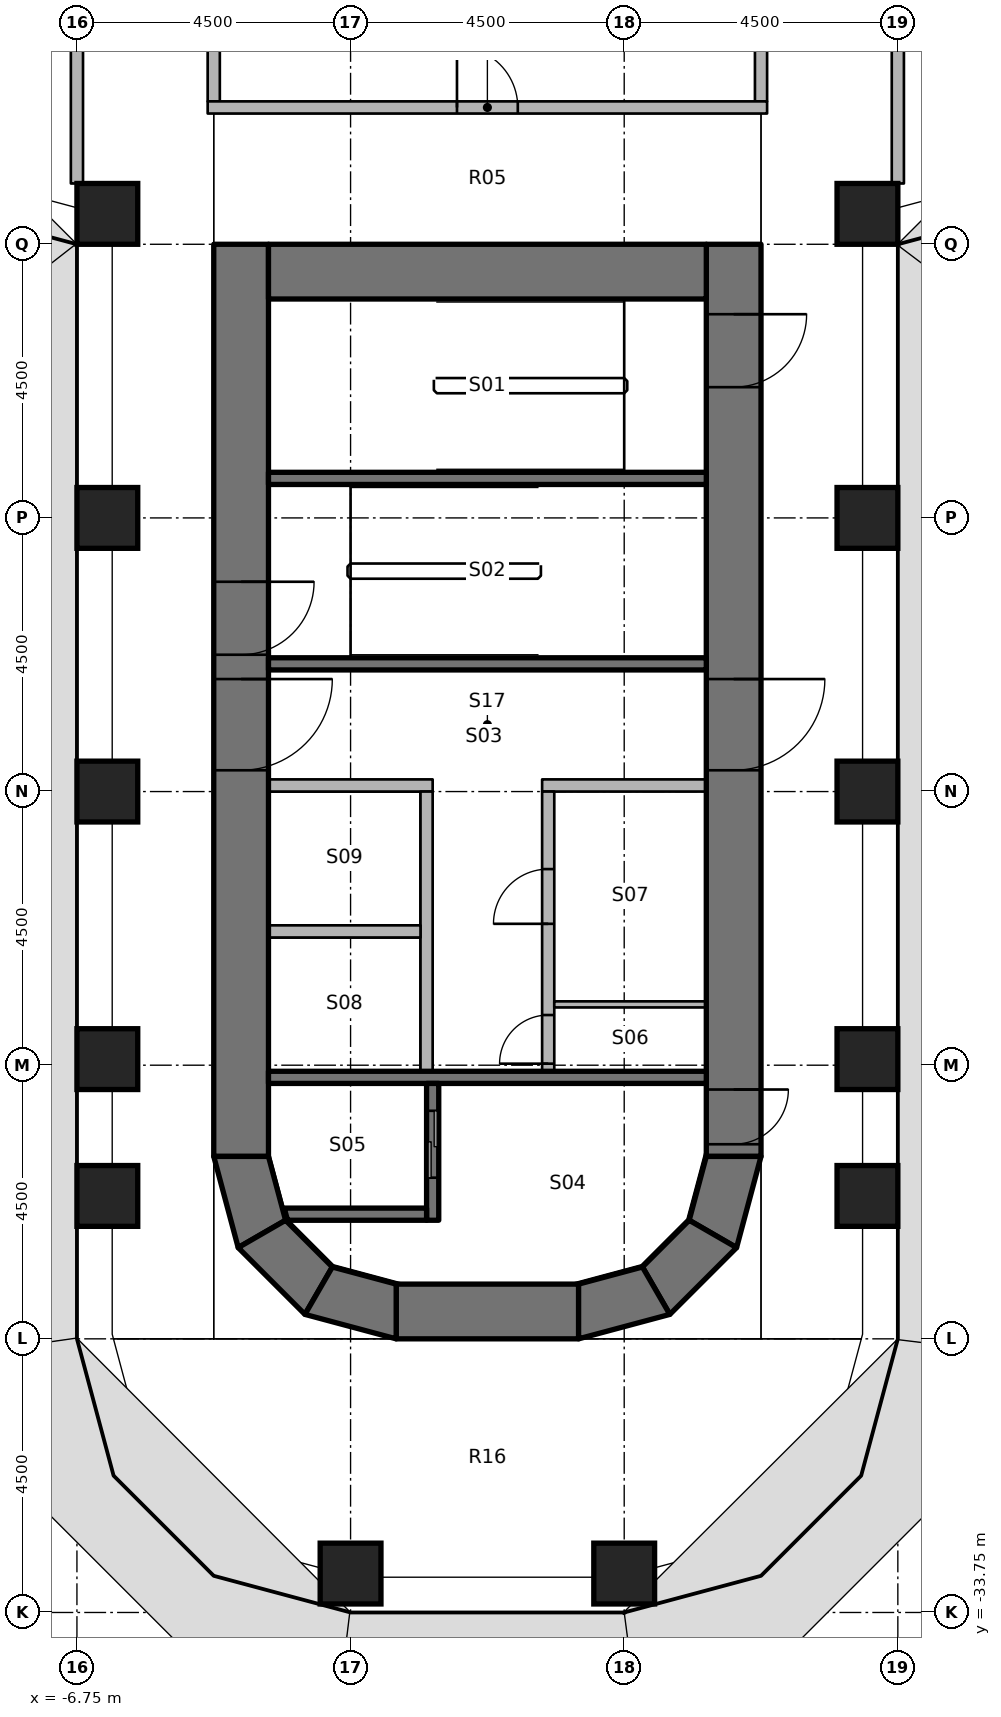
"""IFC4 building model, lengths in metres.
Left out: names, types, materials, properties, quantities, classifications, styles, units other than length and angle.
Written with IfcOpenShell. Run it as: python <this file> out.ifc"""

import sys

from ifc_helpers import new_model, si_unit, direction, frame, frame_2d, origin, origin_2d, place, context, subcontext, project, spatial, polyline, rectangle, outline, extrude, element, fill, save


model = new_model("IFC4")
c1 = context("Model", 3, precision=1e-05, world=origin(), true_north=direction((0.0, 1.0)))
c2 = subcontext(c1, "Body", "Model", "MODEL_VIEW")
j1 = project(units=[si_unit("LENGTHUNIT", "METRE"), si_unit("PLANEANGLEUNIT", "RADIAN")], contexts=[c1])
p1 = place(None, origin())
s1 = spatial("IfcSite", under=j1, at=p1, CompositionType="ELEMENT")
p2 = place(p1, origin())
s2 = spatial("IfcBuilding", under=s1, at=p2, CompositionType="ELEMENT")
p3 = place(p2, frame((0.0, 0.0, 31.2)))
s3 = spatial("IfcBuildingStorey", under=s2, at=p3, CompositionType="ELEMENT", Elevation=31.2)
for number, where, z_axis, x_axis in (
    (1, (-6.25, -26.9, 0.0), (0.0, 0.0, 1.0), (1.0, 0.0, 0.0)),
    (2, (-6.25, -24.65, 0.0), (0.0, 0.0, 1.0), (1.0, 0.0, 0.0)),
    (3, (-6.25, -20.25, 0.0), (0.0, 0.0, 1.0), (1.0, 0.0, 0.0)),
    (4, (-6.25, -15.75, 0.0), (0.0, 0.0, 1.0), (1.0, 0.0, 0.0)),
    (5, (-6.25, -10.75, 0.0), (0.0, 0.0, 1.0), (1.0, 0.0, 0.0)),
    (6, (-2.25, -33.11, 0.0), (0.0, 0.0, 1.0), (1.0, 0.0, 0.0)),
    (7, (2.25, -33.11, 0.0), (0.0, 0.0, 1.0), (1.0, 0.0, 0.0)),
    (8, (6.25, -26.9, 0.0), (0.0, 0.0, 1.0), (1.0, 0.0, 0.0)),
    (9, (6.25, -24.65, 0.0), (0.0, 0.0, 1.0), (1.0, 0.0, 0.0)),
    (10, (6.25, -20.25, 0.0), (0.0, 0.0, 1.0), (1.0, 0.0, 0.0)),
    (11, (6.25, -15.75, 0.0), (0.0, 0.0, 1.0), (1.0, 0.0, 0.0)),
    (12, (6.25, -10.75, 0.0), (0.0, 0.0, 1.0), (1.0, 0.0, 0.0)),
):
    element("IfcColumn", number, at=place(p3, frame(where, z_axis=z_axis, x_axis=x_axis)), inside=s3, PredefinedType="COLUMN", context=c2, shape_type="SweptSolid", body=[
        extrude(rectangle(XDim=1.0, YDim=1.0, at=origin_2d()), origin(), (0.0, 0.0, 1.0), 4.05),
    ])
p4 = place(p3, frame((-4.05, -11.25, 0.0), z_axis=(0.0, 0.0, 1.0), x_axis=(0.0, -1.0, 0.0)))
e13 = element("IfcWall", 13, at=p4, inside=s3, PredefinedType="SHEAR", context=c2, shape_type="SweptSolid", body=[
    extrude(rectangle(XDim=15.0, YDim=0.9, at=frame_2d((7.5, 0.0))), origin(), (0.0, 0.0, 1.0), 4.2),
])
p5 = place(p4, frame((7.15, 0.0, 0.0)))
e14 = element("IfcOpeningElement", 14, at=p5, cuts=e13, PredefinedType="OPENING", context=c2, shape_type="SweptSolid", body=[
    extrude(rectangle(XDim=1.5, YDim=2.3, at=frame_2d((0.75, 1.15))), frame((0.0, 0.46, 0.0), z_axis=(0.0, -1.0, 0.0), x_axis=(1.0, 0.0, 0.0)), (0.0, 0.0, 1.0), 0.92),
])
p6 = place(p4, frame((5.55, 0.0, 0.0)))
e15 = element("IfcOpeningElement", 15, at=p6, cuts=e13, PredefinedType="OPENING", context=c2, shape_type="SweptSolid", body=[
    extrude(rectangle(XDim=1.2, YDim=2.1, at=frame_2d((0.6, 1.05))), frame((0.0, 0.46, 0.0), z_axis=(0.0, -1.0, 0.0), x_axis=(1.0, 0.0, 0.0)), (0.0, 0.0, 1.0), 0.92),
])
p7 = place(p3, frame((4.05, -11.25, 0.0), z_axis=(0.0, 0.0, 1.0), x_axis=(0.0, -1.0, 0.0)))
e16 = element("IfcWall", 16, at=p7, inside=s3, PredefinedType="SHEAR", context=c2, shape_type="SweptSolid", body=[
    extrude(rectangle(XDim=15.0, YDim=0.9, at=frame_2d((7.5, 0.0))), origin(), (0.0, 0.0, 1.0), 4.2),
])
p8 = place(p7, frame((7.15, 0.0, 0.0)))
e17 = element("IfcOpeningElement", 17, at=p8, cuts=e16, PredefinedType="OPENING", context=c2, shape_type="SweptSolid", body=[
    extrude(rectangle(XDim=1.5, YDim=2.3, at=frame_2d((0.75, 1.15))), frame((0.0, 0.46, 0.0), z_axis=(0.0, -1.0, 0.0), x_axis=(1.0, 0.0, 0.0)), (0.0, 0.0, 1.0), 0.92),
])
p9 = place(p7, frame((13.9, 0.0, 0.0)))
e18 = element("IfcOpeningElement", 18, at=p9, cuts=e16, PredefinedType="OPENING", context=c2, shape_type="SweptSolid", body=[
    extrude(rectangle(XDim=0.9, YDim=2.1, at=frame_2d((0.45, 1.05))), frame((0.0, 0.46, 0.0), z_axis=(0.0, -1.0, 0.0), x_axis=(1.0, 0.0, 0.0)), (0.0, 0.0, 1.0), 0.92),
])
p10 = place(p7, frame((1.15, 0.0, 0.0)))
e19 = element("IfcOpeningElement", 19, at=p10, cuts=e16, PredefinedType="OPENING", context=c2, shape_type="SweptSolid", body=[
    extrude(rectangle(XDim=1.2, YDim=2.1, at=frame_2d((0.6, 1.05))), frame((0.0, 0.46, 0.0), z_axis=(0.0, -1.0, 0.0), x_axis=(1.0, 0.0, 0.0)), (0.0, 0.0, 1.0), 0.92),
])
p11 = place(p3, frame((-3.6, -11.7, 0.0), z_axis=(0.0, 0.0, 1.0), x_axis=(1.0, 0.0, 0.0)))
e20 = element("IfcWall", 20, at=p11, inside=s3, PredefinedType="SHEAR", context=c2, shape_type="SweptSolid", body=[
    extrude(rectangle(XDim=7.2, YDim=0.9, at=frame_2d((3.6, 0.0))), origin(), (0.0, 0.0, 1.0), 4.2),
])
p12 = place(p3, frame((-1.5, -28.8, 0.0), z_axis=(0.0, 0.0, 1.0), x_axis=(1.0, 0.0, 0.0)))
e21 = element("IfcWall", 21, at=p12, inside=s3, PredefinedType="SHEAR", context=c2, shape_type="SweptSolid", body=[
    extrude(rectangle(XDim=3.0, YDim=0.9, at=frame_2d((1.5, 0.0))), origin(), (0.0, 0.0, 1.0), 4.2),
])
p13 = place(p3, origin())
e22 = element("IfcWall", 22, at=p13, inside=s3, PredefinedType="SHEAR", context=c2, shape_type="SweptSolid", body=[
    extrude(outline(polyline([(-4.5, -26.25), (-4.098, -27.75), (-3.319, -27.3), (-3.6, -26.25), (-4.5, -26.25)])), origin(), (0.0, 0.0, 1.0), 4.2),
])
p14 = place(p3, origin())
e23 = element("IfcWall", 23, at=p14, inside=s3, PredefinedType="SHEAR", context=c2, shape_type="SweptSolid", body=[
    extrude(outline(polyline([(-4.098, -27.75), (-3.0, -28.848), (-2.55, -28.069), (-3.319, -27.3), (-4.098, -27.75)])), origin(), (0.0, 0.0, 1.0), 4.2),
])
p15 = place(p3, origin())
e24 = element("IfcWall", 24, at=p15, inside=s3, PredefinedType="SHEAR", context=c2, shape_type="SweptSolid", body=[
    extrude(outline(polyline([(-3.0, -28.848), (-1.5, -29.25), (-1.5, -28.35), (-2.55, -28.069), (-3.0, -28.848)])), origin(), (0.0, 0.0, 1.0), 4.2),
])
p16 = place(p3, origin())
e25 = element("IfcWall", 25, at=p16, inside=s3, PredefinedType="SHEAR", context=c2, shape_type="SweptSolid", body=[
    extrude(outline(polyline([(4.5, -26.25), (4.098, -27.75), (3.319, -27.3), (3.6, -26.25), (4.5, -26.25)])), origin(), (0.0, 0.0, 1.0), 4.2),
])
p17 = place(p3, origin())
e26 = element("IfcWall", 26, at=p17, inside=s3, PredefinedType="SHEAR", context=c2, shape_type="SweptSolid", body=[
    extrude(outline(polyline([(4.098, -27.75), (3.0, -28.848), (2.55, -28.069), (3.319, -27.3), (4.098, -27.75)])), origin(), (0.0, 0.0, 1.0), 4.2),
])
p18 = place(p3, origin())
e27 = element("IfcWall", 27, at=p18, inside=s3, PredefinedType="SHEAR", context=c2, shape_type="SweptSolid", body=[
    extrude(outline(polyline([(3.0, -28.848), (1.5, -29.25), (1.5, -28.35), (2.55, -28.069), (3.0, -28.848)])), origin(), (0.0, 0.0, 1.0), 4.2),
])
p19 = place(p3, frame((3.6, -24.95, 0.0), z_axis=(0.0, 0.0, 1.0), x_axis=(-1.0, 0.0, 0.0)))
e28 = element("IfcWall", 28, at=p19, inside=s3, PredefinedType="SHEAR", context=c2, shape_type="SweptSolid", body=[
    extrude(rectangle(XDim=7.2, YDim=0.2, at=frame_2d((3.6, 0.0))), origin(), (0.0, 0.0, 1.0), 4.05),
])
p20 = place(p3, frame((-0.9, -27.3, 0.0), z_axis=(0.0, 0.0, 1.0), x_axis=(0.0, 1.0, 0.0)))
e29 = element("IfcWall", 29, at=p20, inside=s3, PredefinedType="SHEAR", context=c2, shape_type="SweptSolid", body=[
    extrude(rectangle(XDim=2.25, YDim=0.2, at=frame_2d((1.125, 0.0))), origin(), (0.0, 0.0, 1.0), 4.05),
])
p21 = place(p20, frame((0.7, 0.0, 0.0)))
e30 = element("IfcOpeningElement", 30, at=p21, cuts=e29, PredefinedType="OPENING", context=c2, shape_type="SweptSolid", body=[
    extrude(rectangle(XDim=1.1, YDim=2.3, at=frame_2d((0.55, 1.15))), frame((0.0, 0.11, 0.0), z_axis=(0.0, -1.0, 0.0), x_axis=(1.0, 0.0, 0.0)), (0.0, 0.0, 1.0), 0.22),
])
p22 = place(p3, origin())
e31 = element("IfcWall", 31, at=p22, inside=s3, PredefinedType="SHEAR", context=c2, shape_type="SweptSolid", body=[
    extrude(outline(polyline([(-1.0, -27.1), (-3.341, -27.1), (-3.291, -27.284), (-3.275, -27.3), (-1.0, -27.3), (-1.0, -27.1)])), origin(), (0.0, 0.0, 1.0), 4.05),
])
for number, where, z_axis, x_axis in (
    (32, (3.6, -18.15, 0.0), (0.0, 0.0, 1.0), (-1.0, 0.0, 0.0)),
    (33, (3.6, -15.1, 0.0), (0.0, 0.0, 1.0), (-1.0, 0.0, 0.0)),
):
    element("IfcWall", number, at=place(p3, frame(where, z_axis=z_axis, x_axis=x_axis)), inside=s3, PredefinedType="SHEAR", context=c2, shape_type="SweptSolid", body=[
        extrude(rectangle(XDim=7.2, YDim=0.2, at=frame_2d((3.6, 0.0))), origin(), (0.0, 0.0, 1.0), 4.05),
    ])
p23 = place(p3, frame((3.6, -20.15, 0.0), z_axis=(0.0, 0.0, 1.0), x_axis=(-1.0, 0.0, 0.0)))
e34 = element("IfcWall", 34, at=p23, inside=s3, PredefinedType="PARTITIONING", context=c2, shape_type="SweptSolid", body=[
    extrude(rectangle(XDim=2.7, YDim=0.2, at=frame_2d((1.35, 0.0))), origin(), (0.0, 0.0, 1.0), 4.05),
])
p24 = place(p3, frame((1.0, -24.85, 0.0), z_axis=(0.0, 0.0, 1.0), x_axis=(0.0, 1.0, 0.0)))
e35 = element("IfcWall", 35, at=p24, inside=s3, PredefinedType="PARTITIONING", context=c2, shape_type="SweptSolid", body=[
    extrude(rectangle(XDim=4.6, YDim=0.2, at=frame_2d((2.3, 0.0))), origin(), (0.0, 0.0, 1.0), 4.05),
])
p25 = place(p24, frame((0.125, 0.0, 0.0)))
e36 = element("IfcOpeningElement", 36, at=p25, cuts=e35, PredefinedType="OPENING", context=c2, shape_type="SweptSolid", body=[
    extrude(rectangle(XDim=0.8, YDim=2.1, at=frame_2d((0.4, 1.05))), frame((0.0, 0.11, 0.0), z_axis=(0.0, -1.0, 0.0), x_axis=(1.0, 0.0, 0.0)), (0.0, 0.0, 1.0), 0.22),
])
p26 = place(p24, frame((2.425, 0.0, 0.0)))
e37 = element("IfcOpeningElement", 37, at=p26, cuts=e35, PredefinedType="OPENING", context=c2, shape_type="SweptSolid", body=[
    extrude(rectangle(XDim=0.9, YDim=2.1, at=frame_2d((0.45, 1.05))), frame((0.0, 0.11, 0.0), z_axis=(0.0, -1.0, 0.0), x_axis=(1.0, 0.0, 0.0)), (0.0, 0.0, 1.0), 0.22),
])
p27 = place(p3, frame((-0.9, -20.15, 0.0), z_axis=(0.0, 0.0, 1.0), x_axis=(-1.0, 0.0, 0.0)))
e38 = element("IfcWall", 38, at=p27, inside=s3, PredefinedType="PARTITIONING", context=c2, shape_type="SweptSolid", body=[
    extrude(rectangle(XDim=2.7, YDim=0.2, at=frame_2d((1.35, 0.0))), origin(), (0.0, 0.0, 1.0), 4.05),
])
p28 = place(p3, frame((-1.0, -24.85, 0.0), z_axis=(0.0, 0.0, 1.0), x_axis=(0.0, 1.0, 0.0)))
e39 = element("IfcWall", 39, at=p28, inside=s3, PredefinedType="PARTITIONING", context=c2, shape_type="SweptSolid", body=[
    extrude(rectangle(XDim=4.6, YDim=0.2, at=frame_2d((2.3, 0.0))), origin(), (0.0, 0.0, 1.0), 4.05),
])
p29 = place(p3, frame((3.6, -23.75, 0.0), z_axis=(0.0, 0.0, 1.0), x_axis=(-1.0, 0.0, 0.0)))
e40 = element("IfcWall", 40, at=p29, inside=s3, PredefinedType="PARTITIONING", context=c2, shape_type="SweptSolid", body=[
    extrude(rectangle(XDim=2.5, YDim=0.1, at=frame_2d((1.25, 0.0))), origin(), (0.0, 0.0, 1.0), 4.05),
])
p30 = place(p3, frame((-1.1, -22.55, 0.0), z_axis=(0.0, 0.0, 1.0), x_axis=(-1.0, 0.0, 0.0)))
e41 = element("IfcWall", 41, at=p30, inside=s3, PredefinedType="PARTITIONING", context=c2, shape_type="SweptSolid", body=[
    extrude(rectangle(XDim=2.5, YDim=0.2, at=frame_2d((1.25, 0.0))), origin(), (0.0, 0.0, 1.0), 4.05),
])
p31 = place(p3, frame((-4.5, -8.9, 0.0), z_axis=(0.0, 0.0, 1.0), x_axis=(0.0, 1.0, 0.0)))
e42 = element("IfcWall", 42, at=p31, inside=s3, PredefinedType="PARTITIONING", context=c2, shape_type="SweptSolid", body=[
    extrude(rectangle(XDim=5.8, YDim=0.2, at=frame_2d((2.9, 0.0))), origin(), (0.0, 0.0, 1.0), 3.131),
])
p32 = place(p3, frame((-6.75, -10.25, 0.0), z_axis=(0.0, 0.0, 1.0), x_axis=(0.0, 1.0, 0.0)))
e43 = element("IfcWall", 43, at=p32, inside=s3, PredefinedType="PARTITIONING", context=c2, shape_type="SweptSolid", body=[
    extrude(rectangle(XDim=3.5, YDim=0.2, at=frame_2d((1.75, 0.0))), origin(), (0.0, 0.0, 1.0), 3.131),
])
p33 = place(p3, frame((4.5, -8.9, 0.0), z_axis=(0.0, 0.0, 1.0), x_axis=(0.0, 1.0, 0.0)))
e44 = element("IfcWall", 44, at=p33, inside=s3, PredefinedType="PARTITIONING", context=c2, shape_type="SweptSolid", body=[
    extrude(rectangle(XDim=5.8, YDim=0.2, at=frame_2d((2.9, 0.0))), origin(), (0.0, 0.0, 1.0), 3.131),
])
p34 = place(p3, frame((6.75, -10.25, 0.0), z_axis=(0.0, 0.0, 1.0), x_axis=(0.0, 1.0, 0.0)))
e45 = element("IfcWall", 45, at=p34, inside=s3, PredefinedType="PARTITIONING", context=c2, shape_type="SweptSolid", body=[
    extrude(rectangle(XDim=3.5, YDim=0.2, at=frame_2d((1.75, 0.0))), origin(), (0.0, 0.0, 1.0), 3.131),
])
p35 = place(p3, frame((-4.6, -9.0, 0.0), z_axis=(0.0, 0.0, 1.0), x_axis=(1.0, 0.0, 0.0)))
e46 = element("IfcWall", 46, at=p35, inside=s3, PredefinedType="PARTITIONING", context=c2, shape_type="SweptSolid", body=[
    extrude(rectangle(XDim=9.2, YDim=0.2, at=frame_2d((4.6, 0.0))), origin(), (0.0, 0.0, 1.0), 3.131),
])
p36 = place(p35, frame((4.1, 0.0, 0.0)))
e47 = element("IfcOpeningElement", 47, at=p36, cuts=e46, PredefinedType="OPENING", context=c2, shape_type="SweptSolid", body=[
    extrude(rectangle(XDim=1.0, YDim=2.1, at=frame_2d((0.5, 1.05))), frame((0.0, 0.11, 0.0), z_axis=(0.0, -1.0, 0.0), x_axis=(1.0, 0.0, 0.0)), (0.0, 0.0, 1.0), 0.22),
])
p37 = place(p8, origin())
e48 = element("IfcDoor", 48, at=p37, inside=s3, OperationType="DOUBLE_DOOR_SINGLE_SWING", PredefinedType="DOOR", context=c2, shape_type="SweptSolid", body=[
    extrude(rectangle(XDim=1.5, YDim=2.3, at=frame_2d((0.75, 1.15))), frame((0.0, 0.025, 0.0), z_axis=(0.0, -1.0, 0.0), x_axis=(1.0, 0.0, 0.0)), (0.0, 0.0, 1.0), 0.05),
])
fill(e17, e48)
p38 = place(p5, origin())
e49 = element("IfcDoor", 49, at=p38, inside=s3, OperationType="DOUBLE_DOOR_SINGLE_SWING", PredefinedType="DOOR", context=c2, shape_type="SweptSolid", body=[
    extrude(rectangle(XDim=1.5, YDim=2.3, at=frame_2d((0.75, 1.15))), frame((0.0, 0.025, 0.0), z_axis=(0.0, -1.0, 0.0), x_axis=(1.0, 0.0, 0.0)), (0.0, 0.0, 1.0), 0.05),
])
fill(e14, e49)
p39 = place(p9, origin())
e50 = element("IfcDoor", 50, at=p39, inside=s3, OperationType="SINGLE_SWING_LEFT", PredefinedType="DOOR", context=c2, shape_type="SweptSolid", body=[
    extrude(rectangle(XDim=0.9, YDim=2.1, at=frame_2d((0.45, 1.05))), frame((0.0, 0.025, 0.0), z_axis=(0.0, -1.0, 0.0), x_axis=(1.0, 0.0, 0.0)), (0.0, 0.0, 1.0), 0.05),
])
fill(e18, e50)
p40 = place(p6, origin())
e51 = element("IfcDoor", 51, at=p40, inside=s3, OperationType="SINGLE_SWING_LEFT", PredefinedType="DOOR", context=c2, shape_type="SweptSolid", body=[
    extrude(rectangle(XDim=1.2, YDim=2.1, at=frame_2d((0.6, 1.05))), frame((0.0, 0.025, 0.0), z_axis=(0.0, -1.0, 0.0), x_axis=(1.0, 0.0, 0.0)), (0.0, 0.0, 1.0), 0.05),
])
fill(e15, e51)
p41 = place(p10, origin())
e52 = element("IfcDoor", 52, at=p41, inside=s3, OperationType="SINGLE_SWING_RIGHT", PredefinedType="DOOR", context=c2, shape_type="SweptSolid", body=[
    extrude(rectangle(XDim=1.2, YDim=2.1, at=frame_2d((0.6, 1.05))), frame((0.0, 0.025, 0.0), z_axis=(0.0, -1.0, 0.0), x_axis=(1.0, 0.0, 0.0)), (0.0, 0.0, 1.0), 0.05),
])
fill(e19, e52)
p42 = place(p21, origin())
e53 = element("IfcDoor", 53, at=p42, inside=s3, OperationType="DOUBLE_DOOR_SLIDING", PredefinedType="DOOR", context=c2, shape_type="SweptSolid", body=[
    extrude(rectangle(XDim=1.1, YDim=2.3, at=frame_2d((0.55, 1.15))), frame((0.0, 0.025, 0.0), z_axis=(0.0, -1.0, 0.0), x_axis=(1.0, 0.0, 0.0)), (0.0, 0.0, 1.0), 0.05),
])
fill(e30, e53)
p43 = place(p25, origin())
e54 = element("IfcDoor", 54, at=p43, inside=s3, OperationType="SINGLE_SWING_RIGHT", PredefinedType="DOOR", context=c2, shape_type="SweptSolid", body=[
    extrude(rectangle(XDim=0.8, YDim=2.1, at=frame_2d((0.4, 1.05))), frame((0.0, 0.025, 0.0), z_axis=(0.0, -1.0, 0.0), x_axis=(1.0, 0.0, 0.0)), (0.0, 0.0, 1.0), 0.05),
])
fill(e36, e54)
p44 = place(p26, origin())
e55 = element("IfcDoor", 55, at=p44, inside=s3, OperationType="SINGLE_SWING_LEFT", PredefinedType="DOOR", context=c2, shape_type="SweptSolid", body=[
    extrude(rectangle(XDim=0.9, YDim=2.1, at=frame_2d((0.45, 1.05))), frame((0.0, 0.025, 0.0), z_axis=(0.0, -1.0, 0.0), x_axis=(1.0, 0.0, 0.0)), (0.0, 0.0, 1.0), 0.05),
])
fill(e37, e55)
p45 = place(p36, origin())
e56 = element("IfcDoor", 56, at=p45, inside=s3, OperationType="SINGLE_SWING_RIGHT", PredefinedType="DOOR", context=c2, shape_type="SweptSolid", body=[
    extrude(rectangle(XDim=1.0, YDim=2.1, at=frame_2d((0.5, 1.05))), frame((0.0, 0.025, 0.0), z_axis=(0.0, -1.0, 0.0), x_axis=(1.0, 0.0, 0.0)), (0.0, 0.0, 1.0), 0.05),
])
fill(e47, e56)
save(model, sys.argv[1])
